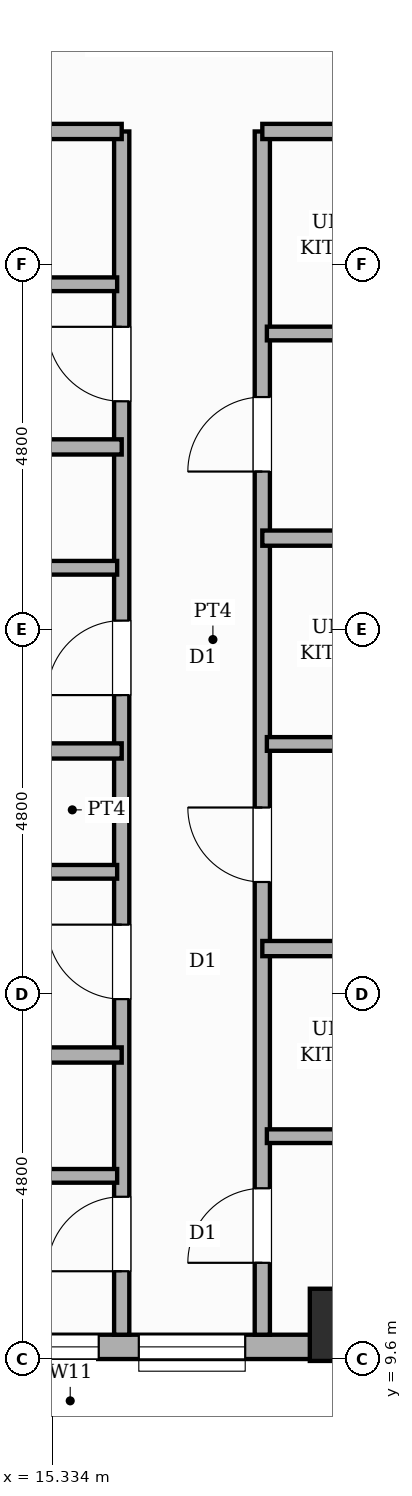
"""IFC4 building model, lengths in metres.
Left out: names, types, materials, properties, quantities, classifications, styles, units other than length and angle.
Written with IfcOpenShell. Run it as: python <this file> out.ifc"""

import sys

from ifc_helpers import new_model, si_unit, direction, frame, frame_2d, origin, origin_2d, place, context, subcontext, project, spatial, rectangle, extrude, element, fill, save


model = new_model("IFC4")
c1 = context("Model", 3, precision=1e-05, world=origin(), true_north=direction((0.0, 1.0)))
c2 = subcontext(c1, "Body", "Model", "MODEL_VIEW")
j1 = project(units=[si_unit("LENGTHUNIT", "METRE"), si_unit("PLANEANGLEUNIT", "RADIAN")], contexts=[c1])
p1 = place(None, origin())
s1 = spatial("IfcSite", under=j1, at=p1, CompositionType="ELEMENT")
p2 = place(p1, origin())
s2 = spatial("IfcBuilding", under=s1, at=p2, CompositionType="ELEMENT")
p3 = place(p2, frame((0.0, 0.0, 110.8)))
s3 = spatial("IfcBuildingStorey", under=s2, at=p3, CompositionType="ELEMENT", Elevation=110.8)
p4 = place(p3, frame((19.2, 10.05, 0.0), z_axis=(0.0, 0.0, 1.0), x_axis=(1.0, 0.0, 0.0)))
e1 = element("IfcColumn", 1, at=p4, inside=s3, PredefinedType="COLUMN", context=c2, shape_type="SweptSolid", body=[
    extrude(rectangle(XDim=0.95, YDim=0.95, at=origin_2d()), origin(), (0.0, 0.0, 1.0), 3.6),
])
p5 = place(p3, frame((21.6, 9.76, 0.0), z_axis=(0.0, 0.0, 1.0), x_axis=(-1.0, 0.0, 0.0)))
e2 = element("IfcWall", 2, at=p5, inside=s3, PredefinedType="STANDARD", context=c2, shape_type="SweptSolid", body=[
    extrude(rectangle(XDim=14.4, YDim=0.32, at=frame_2d((7.2, 0.0))), origin(), (0.0, 0.0, 1.0), 2.54),
])
p6 = place(p5, frame((5.653, 0.0, 0.45)))
e3 = element("IfcOpeningElement", 3, at=p6, cuts=e2, PredefinedType="OPENING", context=c2, shape_type="SweptSolid", body=[
    extrude(rectangle(XDim=0.75, YDim=1.8, at=frame_2d((0.375, 0.9))), frame((0.0, 0.17, 0.0), z_axis=(0.0, -1.0, 0.0), x_axis=(1.0, 0.0, 0.0)), (0.0, 0.0, 1.0), 0.34),
])
p7 = place(p5, frame((0.282, 0.0, 0.65)))
e4 = element("IfcOpeningElement", 4, at=p7, cuts=e2, PredefinedType="OPENING", context=c2, shape_type="SweptSolid", body=[
    extrude(rectangle(XDim=1.4, YDim=1.1, at=frame_2d((0.7, 0.55))), frame((0.0, 0.17, 0.0), z_axis=(0.0, -1.0, 0.0), x_axis=(1.0, 0.0, 0.0)), (0.0, 0.0, 1.0), 0.34),
])
p8 = place(p5, frame((3.725, 0.0, 0.65)))
e5 = element("IfcOpeningElement", 5, at=p8, cuts=e2, PredefinedType="OPENING", context=c2, shape_type="SweptSolid", body=[
    extrude(rectangle(XDim=1.4, YDim=1.1, at=frame_2d((0.7, 0.55))), frame((0.0, 0.17, 0.0), z_axis=(0.0, -1.0, 0.0), x_axis=(1.0, 0.0, 0.0)), (0.0, 0.0, 1.0), 0.34),
])
p9 = place(p3, frame((16.25, 9.92, 0.0), z_axis=(0.0, 0.0, 1.0), x_axis=(0.0, 1.0, 0.0)))
e6 = element("IfcWall", 6, at=p9, inside=s3, PredefinedType="PARTITIONING", context=c2, shape_type="SweptSolid", body=[
    extrude(rectangle(XDim=15.83, YDim=0.2, at=frame_2d((7.915, 0.0))), origin(), (0.0, 0.0, 1.0), 3.36),
])
p10 = place(p9, frame((0.835, 0.0, 0.0)))
e7 = element("IfcOpeningElement", 7, at=p10, cuts=e6, PredefinedType="OPENING", context=c2, shape_type="SweptSolid", body=[
    extrude(rectangle(XDim=0.98, YDim=2.18, at=frame_2d((0.49, 1.09))), frame((0.0, 0.11, 0.0), z_axis=(0.0, -1.0, 0.0), x_axis=(1.0, 0.0, 0.0)), (0.0, 0.0, 1.0), 0.22),
])
p11 = place(p9, frame((4.415, 0.0, 0.0)))
e8 = element("IfcOpeningElement", 8, at=p11, cuts=e6, PredefinedType="OPENING", context=c2, shape_type="SweptSolid", body=[
    extrude(rectangle(XDim=0.98, YDim=2.18, at=frame_2d((0.49, 1.09))), frame((0.0, 0.11, 0.0), z_axis=(0.0, -1.0, 0.0), x_axis=(1.0, 0.0, 0.0)), (0.0, 0.0, 1.0), 0.22),
])
p12 = place(p9, frame((8.415, 0.0, 0.0)))
e9 = element("IfcOpeningElement", 9, at=p12, cuts=e6, PredefinedType="OPENING", context=c2, shape_type="SweptSolid", body=[
    extrude(rectangle(XDim=0.98, YDim=2.18, at=frame_2d((0.49, 1.09))), frame((0.0, 0.11, 0.0), z_axis=(0.0, -1.0, 0.0), x_axis=(1.0, 0.0, 0.0)), (0.0, 0.0, 1.0), 0.22),
])
p13 = place(p9, frame((12.28, 0.0, 0.0)))
e10 = element("IfcOpeningElement", 10, at=p13, cuts=e6, PredefinedType="OPENING", context=c2, shape_type="SweptSolid", body=[
    extrude(rectangle(XDim=0.98, YDim=2.18, at=frame_2d((0.49, 1.09))), frame((0.0, 0.11, 0.0), z_axis=(0.0, -1.0, 0.0), x_axis=(1.0, 0.0, 0.0)), (0.0, 0.0, 1.0), 0.22),
])
p14 = place(p3, frame((18.1, 9.92, 0.0), z_axis=(0.0, 0.0, 1.0), x_axis=(0.0, 1.0, 0.0)))
e11 = element("IfcWall", 11, at=p14, inside=s3, PredefinedType="PARTITIONING", context=c2, shape_type="SweptSolid", body=[
    extrude(rectangle(XDim=15.83, YDim=0.2, at=frame_2d((7.915, 0.0))), origin(), (0.0, 0.0, 1.0), 3.36),
])
p15 = place(p14, frame((0.946, 0.0, 0.0)))
e12 = element("IfcOpeningElement", 12, at=p15, cuts=e11, PredefinedType="OPENING", context=c2, shape_type="SweptSolid", body=[
    extrude(rectangle(XDim=0.98, YDim=2.18, at=frame_2d((0.49, 1.09))), frame((0.0, 0.11, 0.0), z_axis=(0.0, -1.0, 0.0), x_axis=(1.0, 0.0, 0.0)), (0.0, 0.0, 1.0), 0.22),
])
p16 = place(p14, frame((5.956, 0.0, 0.0)))
e13 = element("IfcOpeningElement", 13, at=p16, cuts=e11, PredefinedType="OPENING", context=c2, shape_type="SweptSolid", body=[
    extrude(rectangle(XDim=0.98, YDim=2.18, at=frame_2d((0.49, 1.09))), frame((0.0, 0.11, 0.0), z_axis=(0.0, -1.0, 0.0), x_axis=(1.0, 0.0, 0.0)), (0.0, 0.0, 1.0), 0.22),
])
p17 = place(p14, frame((11.356, 0.0, 0.0)))
e14 = element("IfcOpeningElement", 14, at=p17, cuts=e11, PredefinedType="OPENING", context=c2, shape_type="SweptSolid", body=[
    extrude(rectangle(XDim=0.98, YDim=2.18, at=frame_2d((0.49, 1.09))), frame((0.0, 0.11, 0.0), z_axis=(0.0, -1.0, 0.0), x_axis=(1.0, 0.0, 0.0)), (0.0, 0.0, 1.0), 0.22),
])
p18 = place(p3, frame((5.12, 25.75, 0.0), z_axis=(0.0, 0.0, 1.0), x_axis=(1.0, 0.0, 0.0)))
e15 = element("IfcWall", 15, at=p18, inside=s3, PredefinedType="PARTITIONING", context=c2, shape_type="SweptSolid", body=[
    extrude(rectangle(XDim=11.13, YDim=0.2, at=frame_2d((5.565, 0.0))), origin(), (0.0, 0.0, 1.0), 3.36),
])
p19 = place(p3, frame((18.1, 25.75, 0.0), z_axis=(0.0, 0.0, 1.0), x_axis=(1.0, 0.0, 0.0)))
e16 = element("IfcWall", 16, at=p19, inside=s3, PredefinedType="PARTITIONING", context=c2, shape_type="SweptSolid", body=[
    extrude(rectangle(XDim=5.58, YDim=0.2, at=frame_2d((2.79, 0.0))), origin(), (0.0, 0.0, 1.0), 3.36),
])
p20 = place(p3, frame((5.14, 12.01, 0.0), z_axis=(0.0, 0.0, 1.0), x_axis=(1.0, 0.0, 0.0)))
e17 = element("IfcWall", 17, at=p20, inside=s3, PredefinedType="PLUMBINGWALL", context=c2, shape_type="SweptSolid", body=[
    extrude(rectangle(XDim=11.05, YDim=0.18, at=frame_2d((5.525, 0.0))), origin(), (0.0, 0.0, 1.0), 3.36),
])
p21 = place(p20, frame((2.189, 0.0, 0.0)))
e18 = element("IfcOpeningElement", 18, at=p21, cuts=e17, PredefinedType="OPENING", context=c2, shape_type="SweptSolid", body=[
    extrude(rectangle(XDim=0.86, YDim=2.1, at=frame_2d((0.43, 1.05))), frame((0.0, 0.1, 0.0), z_axis=(0.0, -1.0, 0.0), x_axis=(1.0, 0.0, 0.0)), (0.0, 0.0, 1.0), 0.2),
])
p22 = place(p20, frame((7.804, 0.0, 0.0)))
e19 = element("IfcOpeningElement", 19, at=p22, cuts=e17, PredefinedType="OPENING", context=c2, shape_type="SweptSolid", body=[
    extrude(rectangle(XDim=0.86, YDim=2.1, at=frame_2d((0.43, 1.05))), frame((0.0, 0.1, 0.0), z_axis=(0.0, -1.0, 0.0), x_axis=(1.0, 0.0, 0.0)), (0.0, 0.0, 1.0), 0.2),
])
p23 = place(p3, frame((5.12, 13.6, 0.0), z_axis=(0.0, 0.0, 1.0), x_axis=(1.0, 0.0, 0.0)))
e20 = element("IfcWall", 20, at=p23, inside=s3, PredefinedType="SOLIDWALL", context=c2, shape_type="SweptSolid", body=[
    extrude(rectangle(XDim=11.13, YDim=0.2, at=frame_2d((5.565, 0.0))), origin(), (0.0, 0.0, 1.0), 3.36),
])
p24 = place(p3, frame((5.12, 16.01, 0.0), z_axis=(0.0, 0.0, 1.0), x_axis=(1.0, 0.0, 0.0)))
e21 = element("IfcWall", 21, at=p24, inside=s3, PredefinedType="PLUMBINGWALL", context=c2, shape_type="SweptSolid", body=[
    extrude(rectangle(XDim=11.07, YDim=0.18, at=frame_2d((5.535, 0.0))), origin(), (0.0, 0.0, 1.0), 3.36),
])
p25 = place(p24, frame((2.209, 0.0, 0.0)))
e22 = element("IfcOpeningElement", 22, at=p25, cuts=e21, PredefinedType="OPENING", context=c2, shape_type="SweptSolid", body=[
    extrude(rectangle(XDim=0.86, YDim=2.1, at=frame_2d((0.43, 1.05))), frame((0.0, 0.1, 0.0), z_axis=(0.0, -1.0, 0.0), x_axis=(1.0, 0.0, 0.0)), (0.0, 0.0, 1.0), 0.2),
])
p26 = place(p24, frame((7.824, 0.0, 0.0)))
e23 = element("IfcOpeningElement", 23, at=p26, cuts=e21, PredefinedType="OPENING", context=c2, shape_type="SweptSolid", body=[
    extrude(rectangle(XDim=0.86, YDim=2.1, at=frame_2d((0.43, 1.05))), frame((0.0, 0.1, 0.0), z_axis=(0.0, -1.0, 0.0), x_axis=(1.0, 0.0, 0.0)), (0.0, 0.0, 1.0), 0.2),
])
p27 = place(p3, frame((5.12, 17.6, 0.0), z_axis=(0.0, 0.0, 1.0), x_axis=(1.0, 0.0, 0.0)))
e24 = element("IfcWall", 24, at=p27, inside=s3, PredefinedType="SOLIDWALL", context=c2, shape_type="SweptSolid", body=[
    extrude(rectangle(XDim=11.13, YDim=0.2, at=frame_2d((5.565, 0.0))), origin(), (0.0, 0.0, 1.0), 3.36),
])
p28 = place(p3, frame((5.12, 20.01, 0.0), z_axis=(0.0, 0.0, 1.0), x_axis=(1.0, 0.0, 0.0)))
e25 = element("IfcWall", 25, at=p28, inside=s3, PredefinedType="PLUMBINGWALL", context=c2, shape_type="SweptSolid", body=[
    extrude(rectangle(XDim=11.07, YDim=0.18, at=frame_2d((5.535, 0.0))), origin(), (0.0, 0.0, 1.0), 3.36),
])
p29 = place(p28, frame((2.209, 0.0, 0.0)))
e26 = element("IfcOpeningElement", 26, at=p29, cuts=e25, PredefinedType="OPENING", context=c2, shape_type="SweptSolid", body=[
    extrude(rectangle(XDim=0.86, YDim=2.1, at=frame_2d((0.43, 1.05))), frame((0.0, 0.1, 0.0), z_axis=(0.0, -1.0, 0.0), x_axis=(1.0, 0.0, 0.0)), (0.0, 0.0, 1.0), 0.2),
])
p30 = place(p28, frame((7.824, 0.0, 0.0)))
e27 = element("IfcOpeningElement", 27, at=p30, cuts=e25, PredefinedType="OPENING", context=c2, shape_type="SweptSolid", body=[
    extrude(rectangle(XDim=0.86, YDim=2.1, at=frame_2d((0.43, 1.05))), frame((0.0, 0.1, 0.0), z_axis=(0.0, -1.0, 0.0), x_axis=(1.0, 0.0, 0.0)), (0.0, 0.0, 1.0), 0.2),
])
p31 = place(p3, frame((5.12, 21.6, 0.0), z_axis=(0.0, 0.0, 1.0), x_axis=(1.0, 0.0, 0.0)))
e28 = element("IfcWall", 28, at=p31, inside=s3, PredefinedType="SOLIDWALL", context=c2, shape_type="SweptSolid", body=[
    extrude(rectangle(XDim=11.13, YDim=0.2, at=frame_2d((5.565, 0.0))), origin(), (0.0, 0.0, 1.0), 3.36),
])
p32 = place(p3, frame((5.12, 23.74, 0.0), z_axis=(0.0, 0.0, 1.0), x_axis=(1.0, 0.0, 0.0)))
e29 = element("IfcWall", 29, at=p32, inside=s3, PredefinedType="PLUMBINGWALL", context=c2, shape_type="SweptSolid", body=[
    extrude(rectangle(XDim=11.07, YDim=0.18, at=frame_2d((5.535, 0.0))), origin(), (0.0, 0.0, 1.0), 2.54),
])
p33 = place(p32, frame((2.209, 0.0, 0.0)))
e30 = element("IfcOpeningElement", 30, at=p33, cuts=e29, PredefinedType="OPENING", context=c2, shape_type="SweptSolid", body=[
    extrude(rectangle(XDim=0.86, YDim=2.1, at=frame_2d((0.43, 1.05))), frame((0.0, 0.1, 0.0), z_axis=(0.0, -1.0, 0.0), x_axis=(1.0, 0.0, 0.0)), (0.0, 0.0, 1.0), 0.2),
])
p34 = place(p32, frame((7.824, 0.0, 0.0)))
e31 = element("IfcOpeningElement", 31, at=p34, cuts=e29, PredefinedType="OPENING", context=c2, shape_type="SweptSolid", body=[
    extrude(rectangle(XDim=0.86, YDim=2.1, at=frame_2d((0.43, 1.05))), frame((0.0, 0.1, 0.0), z_axis=(0.0, -1.0, 0.0), x_axis=(1.0, 0.0, 0.0)), (0.0, 0.0, 1.0), 0.2),
])
p35 = place(p3, frame((18.16, 12.532, 0.0), z_axis=(0.0, 0.0, 1.0), x_axis=(1.0, 0.0, 0.0)))
e32 = element("IfcWall", 32, at=p35, inside=s3, PredefinedType="PLUMBINGWALL", context=c2, shape_type="SweptSolid", body=[
    extrude(rectangle(XDim=5.52, YDim=0.18, at=frame_2d((2.76, 0.0))), origin(), (0.0, 0.0, 1.0), 3.36),
])
p36 = place(p35, frame((0.876, 0.0, 0.0)))
e33 = element("IfcOpeningElement", 33, at=p36, cuts=e32, PredefinedType="OPENING", context=c2, shape_type="SweptSolid", body=[
    extrude(rectangle(XDim=0.86, YDim=2.1, at=frame_2d((0.43, 1.05))), frame((0.0, 0.1, 0.0), z_axis=(0.0, -1.0, 0.0), x_axis=(1.0, 0.0, 0.0)), (0.0, 0.0, 1.0), 0.2),
])
p37 = place(p35, frame((3.716, 0.0, 0.0)))
e34 = element("IfcOpeningElement", 34, at=p37, cuts=e32, PredefinedType="OPENING", context=c2, shape_type="SweptSolid", body=[
    extrude(rectangle(XDim=0.86, YDim=2.1, at=frame_2d((0.43, 1.05))), frame((0.0, 0.1, 0.0), z_axis=(0.0, -1.0, 0.0), x_axis=(1.0, 0.0, 0.0)), (0.0, 0.0, 1.0), 0.2),
])
p38 = place(p3, frame((18.1, 15.0, 0.0), z_axis=(0.0, 0.0, 1.0), x_axis=(1.0, 0.0, 0.0)))
e35 = element("IfcWall", 35, at=p38, inside=s3, PredefinedType="SOLIDWALL", context=c2, shape_type="SweptSolid", body=[
    extrude(rectangle(XDim=5.58, YDim=0.2, at=frame_2d((2.79, 0.0))), origin(), (0.0, 0.0, 1.0), 3.36),
])
p39 = place(p3, frame((18.16, 17.692, 0.0), z_axis=(0.0, 0.0, 1.0), x_axis=(1.0, 0.0, 0.0)))
e36 = element("IfcWall", 36, at=p39, inside=s3, PredefinedType="PLUMBINGWALL", context=c2, shape_type="SweptSolid", body=[
    extrude(rectangle(XDim=5.52, YDim=0.18, at=frame_2d((2.76, 0.0))), origin(), (0.0, 0.0, 1.0), 3.36),
])
p40 = place(p39, frame((0.876, 0.0, 0.0)))
e37 = element("IfcOpeningElement", 37, at=p40, cuts=e36, PredefinedType="OPENING", context=c2, shape_type="SweptSolid", body=[
    extrude(rectangle(XDim=0.86, YDim=2.1, at=frame_2d((0.43, 1.05))), frame((0.0, 0.1, 0.0), z_axis=(0.0, -1.0, 0.0), x_axis=(1.0, 0.0, 0.0)), (0.0, 0.0, 1.0), 0.2),
])
p41 = place(p39, frame((3.716, 0.0, 0.0)))
e38 = element("IfcOpeningElement", 38, at=p41, cuts=e36, PredefinedType="OPENING", context=c2, shape_type="SweptSolid", body=[
    extrude(rectangle(XDim=0.86, YDim=2.1, at=frame_2d((0.43, 1.05))), frame((0.0, 0.1, 0.0), z_axis=(0.0, -1.0, 0.0), x_axis=(1.0, 0.0, 0.0)), (0.0, 0.0, 1.0), 0.2),
])
p42 = place(p3, frame((18.1, 20.4, 0.0), z_axis=(0.0, 0.0, 1.0), x_axis=(1.0, 0.0, 0.0)))
e39 = element("IfcWall", 39, at=p42, inside=s3, PredefinedType="SOLIDWALL", context=c2, shape_type="SweptSolid", body=[
    extrude(rectangle(XDim=5.58, YDim=0.2, at=frame_2d((2.79, 0.0))), origin(), (0.0, 0.0, 1.0), 3.36),
])
p43 = place(p3, frame((18.16, 23.092, 0.0), z_axis=(0.0, 0.0, 1.0), x_axis=(1.0, 0.0, 0.0)))
e40 = element("IfcWall", 40, at=p43, inside=s3, PredefinedType="PLUMBINGWALL", context=c2, shape_type="SweptSolid", body=[
    extrude(rectangle(XDim=5.52, YDim=0.18, at=frame_2d((2.76, 0.0))), origin(), (0.0, 0.0, 1.0), 3.36),
])
p44 = place(p43, frame((0.876, 0.0, 0.0)))
e41 = element("IfcOpeningElement", 41, at=p44, cuts=e40, PredefinedType="OPENING", context=c2, shape_type="SweptSolid", body=[
    extrude(rectangle(XDim=0.86, YDim=2.1, at=frame_2d((0.43, 1.05))), frame((0.0, 0.1, 0.0), z_axis=(0.0, -1.0, 0.0), x_axis=(1.0, 0.0, 0.0)), (0.0, 0.0, 1.0), 0.2),
])
p45 = place(p43, frame((3.716, 0.0, 0.0)))
e42 = element("IfcOpeningElement", 42, at=p45, cuts=e40, PredefinedType="OPENING", context=c2, shape_type="SweptSolid", body=[
    extrude(rectangle(XDim=0.86, YDim=2.1, at=frame_2d((0.43, 1.05))), frame((0.0, 0.1, 0.0), z_axis=(0.0, -1.0, 0.0), x_axis=(1.0, 0.0, 0.0)), (0.0, 0.0, 1.0), 0.2),
])
p46 = place(p6, origin())
e43 = element("IfcWindow", 43, at=p46, inside=s3, PartitioningType="SINGLE_PANEL", PredefinedType="WINDOW", context=c2, shape_type="SweptSolid", body=[
    extrude(rectangle(XDim=0.75, YDim=1.8, at=frame_2d((0.375, 0.9))), frame((0.0, 0.03, 0.0), z_axis=(0.0, -1.0, 0.0), x_axis=(1.0, 0.0, 0.0)), (0.0, 0.0, 1.0), 0.06),
])
fill(e3, e43)
p47 = place(p8, origin())
e44 = element("IfcWindow", 44, at=p47, inside=s3, PartitioningType="SINGLE_PANEL", PredefinedType="WINDOW", context=c2, shape_type="SweptSolid", body=[
    extrude(rectangle(XDim=1.4, YDim=1.1, at=frame_2d((0.7, 0.55))), frame((0.0, 0.03, 0.0), z_axis=(0.0, -1.0, 0.0), x_axis=(1.0, 0.0, 0.0)), (0.0, 0.0, 1.0), 0.06),
])
fill(e5, e44)
p48 = place(p10, origin())
e45 = element("IfcDoor", 45, at=p48, inside=s3, OperationType="SINGLE_SWING_LEFT", PredefinedType="DOOR", context=c2, shape_type="SweptSolid", body=[
    extrude(rectangle(XDim=0.98, YDim=2.18, at=frame_2d((0.49, 1.09))), frame((0.0, 0.025, 0.0), z_axis=(0.0, -1.0, 0.0), x_axis=(1.0, 0.0, 0.0)), (0.0, 0.0, 1.0), 0.05),
])
fill(e7, e45)
p49 = place(p11, origin())
e46 = element("IfcDoor", 46, at=p49, inside=s3, OperationType="SINGLE_SWING_RIGHT", PredefinedType="DOOR", context=c2, shape_type="SweptSolid", body=[
    extrude(rectangle(XDim=0.98, YDim=2.18, at=frame_2d((0.49, 1.09))), frame((0.0, 0.025, 0.0), z_axis=(0.0, -1.0, 0.0), x_axis=(1.0, 0.0, 0.0)), (0.0, 0.0, 1.0), 0.05),
])
fill(e8, e46)
p50 = place(p12, origin())
e47 = element("IfcDoor", 47, at=p50, inside=s3, OperationType="SINGLE_SWING_LEFT", PredefinedType="DOOR", context=c2, shape_type="SweptSolid", body=[
    extrude(rectangle(XDim=0.98, YDim=2.18, at=frame_2d((0.49, 1.09))), frame((0.0, 0.025, 0.0), z_axis=(0.0, -1.0, 0.0), x_axis=(1.0, 0.0, 0.0)), (0.0, 0.0, 1.0), 0.05),
])
fill(e9, e47)
p51 = place(p13, origin())
e48 = element("IfcDoor", 48, at=p51, inside=s3, OperationType="SINGLE_SWING_RIGHT", PredefinedType="DOOR", context=c2, shape_type="SweptSolid", body=[
    extrude(rectangle(XDim=0.98, YDim=2.18, at=frame_2d((0.49, 1.09))), frame((0.0, 0.025, 0.0), z_axis=(0.0, -1.0, 0.0), x_axis=(1.0, 0.0, 0.0)), (0.0, 0.0, 1.0), 0.05),
])
fill(e10, e48)
p52 = place(p15, origin())
e49 = element("IfcDoor", 49, at=p52, inside=s3, OperationType="SINGLE_SWING_LEFT", PredefinedType="DOOR", context=c2, shape_type="SweptSolid", body=[
    extrude(rectangle(XDim=0.98, YDim=2.18, at=frame_2d((0.49, 1.09))), frame((0.0, 0.025, 0.0), z_axis=(0.0, -1.0, 0.0), x_axis=(1.0, 0.0, 0.0)), (0.0, 0.0, 1.0), 0.05),
])
fill(e12, e49)
p53 = place(p16, origin())
e50 = element("IfcDoor", 50, at=p53, inside=s3, OperationType="SINGLE_SWING_RIGHT", PredefinedType="DOOR", context=c2, shape_type="SweptSolid", body=[
    extrude(rectangle(XDim=0.98, YDim=2.18, at=frame_2d((0.49, 1.09))), frame((0.0, 0.025, 0.0), z_axis=(0.0, -1.0, 0.0), x_axis=(1.0, 0.0, 0.0)), (0.0, 0.0, 1.0), 0.05),
])
fill(e13, e50)
p54 = place(p17, origin())
e51 = element("IfcDoor", 51, at=p54, inside=s3, OperationType="SINGLE_SWING_LEFT", PredefinedType="DOOR", context=c2, shape_type="SweptSolid", body=[
    extrude(rectangle(XDim=0.98, YDim=2.18, at=frame_2d((0.49, 1.09))), frame((0.0, 0.025, 0.0), z_axis=(0.0, -1.0, 0.0), x_axis=(1.0, 0.0, 0.0)), (0.0, 0.0, 1.0), 0.05),
])
fill(e14, e51)
save(model, sys.argv[1])
